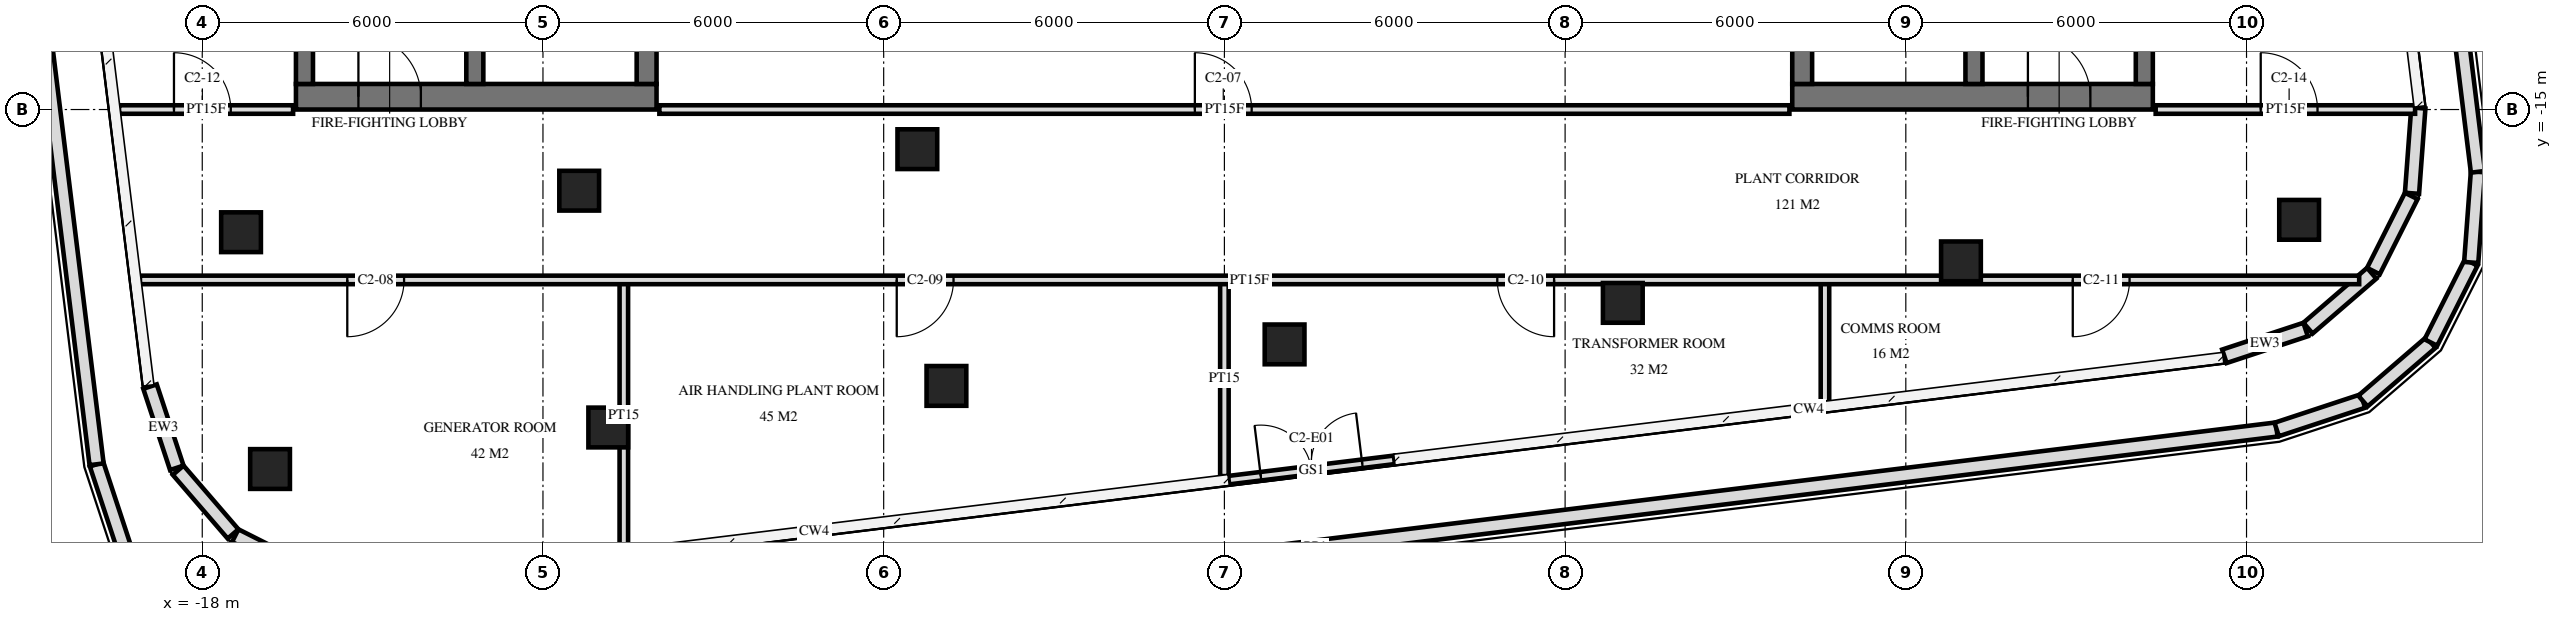
"""IFC4 building model, lengths in metres.
Left out: names, types, materials, properties, quantities, classifications, styles, units other than length and angle.
Written with IfcOpenShell. Run it as: python <this file> out.ifc"""

import sys

from ifc_helpers import new_model, si_unit, direction, frame, frame_2d, origin, origin_2d, place, context, subcontext, project, spatial, rectangle, extrude, element, fill, save


model = new_model("IFC4")
c1 = context("Model", 3, precision=1e-05, world=origin(), true_north=direction((0.0, 1.0)))
c2 = subcontext(c1, "Body", "Model", "MODEL_VIEW")
j1 = project(units=[si_unit("LENGTHUNIT", "METRE"), si_unit("PLANEANGLEUNIT", "RADIAN")], contexts=[c1])
p1 = place(None, origin())
s1 = spatial("IfcSite", under=j1, at=p1, CompositionType="ELEMENT")
p2 = place(p1, origin())
s2 = spatial("IfcBuilding", under=s1, at=p2, CompositionType="ELEMENT")
p3 = place(p2, frame((0.0, 0.0, 350.2)))
s3 = spatial("IfcBuildingStorey", under=s2, at=p3, CompositionType="ELEMENT", Elevation=350.2)
for number, where, z_axis, x_axis in (
    (1, (-17.317, -17.16, 0.0), (0.0, 0.0, 1.0), (1.0, 0.0, 0.0)),
    (2, (-16.806, -21.329, 0.0), (0.0, 0.0, 1.0), (1.0, 0.0, 0.0)),
    (3, (-11.362, -16.429, 0.0), (0.0, 0.0, 1.0), (1.0, 0.0, 0.0)),
    (4, (-10.85, -20.598, 0.0), (0.0, 0.0, 1.0), (1.0, 0.0, 0.0)),
    (5, (-5.407, -15.698, 0.0), (0.0, 0.0, 1.0), (1.0, 0.0, 0.0)),
    (6, (-4.895, -19.866, 0.0), (0.0, 0.0, 1.0), (1.0, 0.0, 0.0)),
    (7, (1.06, -19.135, 0.0), (0.0, 0.0, 1.0), (1.0, 0.0, 0.0)),
    (8, (7.016, -18.404, 0.0), (0.0, 0.0, 1.0), (1.0, 0.0, 0.0)),
    (9, (12.971, -17.673, 0.0), (0.0, 0.0, 1.0), (1.0, 0.0, 0.0)),
    (10, (18.926, -16.942, 0.0), (0.0, 0.0, 1.0), (1.0, 0.0, 0.0)),
):
    element("IfcColumn", number, at=place(p3, frame(where, z_axis=z_axis, x_axis=x_axis)), inside=s3, PredefinedType="COLUMN", context=c2, shape_type="SweptSolid", body=[
        extrude(rectangle(XDim=0.7, YDim=0.7, at=origin_2d()), origin(), (0.0, 0.0, 1.0), 3.6),
    ])
p4 = place(p3, frame((-16.35, -14.775, 0.0), z_axis=(0.0, 0.0, 1.0), x_axis=(1.0, 0.0, 0.0)))
e11 = element("IfcWall", 11, at=p4, inside=s3, PredefinedType="SHEAR", context=c2, shape_type="SweptSolid", body=[
    extrude(rectangle(XDim=6.35, YDim=0.45, at=frame_2d((3.175, 0.0))), origin(), (0.0, 0.0, 1.0), 3.6),
])
p5 = place(p4, frame((1.1, 0.0, 0.0)))
e12 = element("IfcOpeningElement", 12, at=p5, cuts=e11, PredefinedType="OPENING", context=c2, shape_type="SweptSolid", body=[
    extrude(rectangle(XDim=1.1, YDim=2.1, at=frame_2d((0.55, 1.05))), frame((0.0, 0.235, 0.0), z_axis=(0.0, -1.0, 0.0), x_axis=(1.0, 0.0, 0.0)), (0.0, 0.0, 1.0), 0.47),
])
p6 = place(p3, frame((-10.175, -14.55, 0.0), z_axis=(0.0, 0.0, 1.0), x_axis=(0.0, 1.0, 0.0)))
e13 = element("IfcWall", 13, at=p6, inside=s3, PredefinedType="SHEAR", context=c2, shape_type="SweptSolid", body=[
    extrude(rectangle(XDim=14.1, YDim=0.35, at=frame_2d((7.05, 0.0))), origin(), (0.0, 0.0, 1.0), 3.6),
])
p7 = place(p6, frame((4.0, 0.0, 0.0)))
e14 = element("IfcOpeningElement", 14, at=p7, cuts=e13, PredefinedType="OPENING", context=c2, shape_type="SweptSolid", body=[
    extrude(rectangle(XDim=1.2, YDim=2.1, at=frame_2d((0.6, 1.05))), frame((0.0, 0.185, 0.0), z_axis=(0.0, -1.0, 0.0), x_axis=(1.0, 0.0, 0.0)), (0.0, 0.0, 1.0), 0.37),
])
p8 = place(p3, frame((-16.2, -14.55, 0.0), z_axis=(0.0, 0.0, 1.0), x_axis=(0.0, 1.0, 0.0)))
e15 = element("IfcWall", 15, at=p8, inside=s3, PredefinedType="SHEAR", context=c2, shape_type="SweptSolid", body=[
    extrude(rectangle(XDim=5.4, YDim=0.3, at=frame_2d((2.7, 0.0))), origin(), (0.0, 0.0, 1.0), 3.6),
])
p9 = place(p3, frame((-13.2, -14.55, 0.0), z_axis=(0.0, 0.0, 1.0), x_axis=(0.0, 1.0, 0.0)))
e16 = element("IfcWall", 16, at=p9, inside=s3, PredefinedType="SHEAR", context=c2, shape_type="SweptSolid", body=[
    extrude(rectangle(XDim=5.4, YDim=0.3, at=frame_2d((2.7, 0.0))), origin(), (0.0, 0.0, 1.0), 3.6),
])
p10 = place(p9, frame((4.0, 0.0, 0.0)))
e17 = element("IfcOpeningElement", 17, at=p10, cuts=e16, PredefinedType="OPENING", context=c2, shape_type="SweptSolid", body=[
    extrude(rectangle(XDim=1.2, YDim=2.1, at=frame_2d((0.6, 1.05))), frame((0.0, 0.16, 0.0), z_axis=(0.0, -1.0, 0.0), x_axis=(1.0, 0.0, 0.0)), (0.0, 0.0, 1.0), 0.32),
])
p11 = place(p3, frame((10.0, -14.775, 0.0), z_axis=(0.0, 0.0, 1.0), x_axis=(1.0, 0.0, 0.0)))
e18 = element("IfcWall", 18, at=p11, inside=s3, PredefinedType="SHEAR", context=c2, shape_type="SweptSolid", body=[
    extrude(rectangle(XDim=6.35, YDim=0.45, at=frame_2d((3.175, 0.0))), origin(), (0.0, 0.0, 1.0), 3.6),
])
p12 = place(p11, frame((4.15, 0.0, 0.0)))
e19 = element("IfcOpeningElement", 19, at=p12, cuts=e18, PredefinedType="OPENING", context=c2, shape_type="SweptSolid", body=[
    extrude(rectangle(XDim=1.1, YDim=2.1, at=frame_2d((0.55, 1.05))), frame((0.0, 0.235, 0.0), z_axis=(0.0, -1.0, 0.0), x_axis=(1.0, 0.0, 0.0)), (0.0, 0.0, 1.0), 0.47),
])
p13 = place(p3, frame((10.175, -14.55, 0.0), z_axis=(0.0, 0.0, 1.0), x_axis=(0.0, 1.0, 0.0)))
e20 = element("IfcWall", 20, at=p13, inside=s3, PredefinedType="SHEAR", context=c2, shape_type="SweptSolid", body=[
    extrude(rectangle(XDim=14.1, YDim=0.35, at=frame_2d((7.05, 0.0))), origin(), (0.0, 0.0, 1.0), 3.6),
])
p14 = place(p13, frame((4.0, 0.0, 0.0)))
e21 = element("IfcOpeningElement", 21, at=p14, cuts=e20, PredefinedType="OPENING", context=c2, shape_type="SweptSolid", body=[
    extrude(rectangle(XDim=1.2, YDim=2.1, at=frame_2d((0.6, 1.05))), frame((0.0, 0.185, 0.0), z_axis=(0.0, -1.0, 0.0), x_axis=(1.0, 0.0, 0.0)), (0.0, 0.0, 1.0), 0.37),
])
p15 = place(p3, frame((16.2, -14.55, 0.0), z_axis=(0.0, 0.0, 1.0), x_axis=(0.0, 1.0, 0.0)))
e22 = element("IfcWall", 22, at=p15, inside=s3, PredefinedType="SHEAR", context=c2, shape_type="SweptSolid", body=[
    extrude(rectangle(XDim=5.4, YDim=0.3, at=frame_2d((2.7, 0.0))), origin(), (0.0, 0.0, 1.0), 3.6),
])
p16 = place(p3, frame((13.2, -14.55, 0.0), z_axis=(0.0, 0.0, 1.0), x_axis=(0.0, 1.0, 0.0)))
e23 = element("IfcWall", 23, at=p16, inside=s3, PredefinedType="SHEAR", context=c2, shape_type="SweptSolid", body=[
    extrude(rectangle(XDim=5.4, YDim=0.3, at=frame_2d((2.7, 0.0))), origin(), (0.0, 0.0, 1.0), 3.6),
])
p17 = place(p16, frame((4.0, 0.0, 0.0)))
e24 = element("IfcOpeningElement", 24, at=p17, cuts=e23, PredefinedType="OPENING", context=c2, shape_type="SweptSolid", body=[
    extrude(rectangle(XDim=1.2, YDim=2.1, at=frame_2d((0.6, 1.05))), frame((0.0, 0.16, 0.0), z_axis=(0.0, -1.0, 0.0), x_axis=(1.0, 0.0, 0.0)), (0.0, 0.0, 1.0), 0.32),
])
p18 = place(p3, frame((-18.92, -19.878, 0.0), z_axis=(0.0, 0.0, 1.0), x_axis=(0.31321078528, -0.94968363363, 0.0)))
e25 = element("IfcWall", 25, at=p18, inside=s3, PredefinedType="SOLIDWALL", context=c2, shape_type="SweptSolid", body=[
    extrude(rectangle(XDim=1.506, YDim=0.25, at=frame_2d((0.753, 0.0))), origin(), (0.0, 0.0, 1.0), 3.32),
])
p19 = place(p3, frame((-18.424, -21.35, 0.0), z_axis=(0.0, 0.0, 1.0), x_axis=(0.65281239985, -0.757519617305, 0.0)))
e26 = element("IfcWall", 26, at=p19, inside=s3, PredefinedType="SOLIDWALL", context=c2, shape_type="SweptSolid", body=[
    extrude(rectangle(XDim=1.481, YDim=0.25, at=frame_2d((0.74, 0.0))), origin(), (0.0, 0.0, 1.0), 3.32),
])
p20 = place(p3, frame((-17.419, -22.502, 0.0), z_axis=(0.0, 0.0, 1.0), x_axis=(0.893004966714, -0.450046808036, 0.0)))
e27 = element("IfcWall", 27, at=p20, inside=s3, PredefinedType="SOLIDWALL", context=c2, shape_type="SweptSolid", body=[
    extrude(rectangle(XDim=1.481, YDim=0.25, at=frame_2d((0.74, 0.0))), origin(), (0.0, 0.0, 1.0), 3.32),
])
p21 = place(p3, frame((0.075, -21.525, 0.0), z_axis=(0.0, 0.0, 1.0), x_axis=(0.992547507053, 0.121858303952, 0.0)))
e28 = element("IfcWall", 28, at=p21, inside=s3, PredefinedType="USERDEFINED", context=c2, shape_type="SweptSolid", body=[
    extrude(rectangle(XDim=2.941, YDim=0.15, at=frame_2d((1.471, 0.0))), origin(), (0.0, 0.0, 1.0), 3.32),
])
p22 = place(p21, frame((0.571, 0.0, 0.0)))
e29 = element("IfcOpeningElement", 29, at=p22, cuts=e28, PredefinedType="OPENING", context=c2, shape_type="SweptSolid", body=[
    extrude(rectangle(XDim=1.8, YDim=2.4, at=frame_2d((0.9, 1.2))), frame((0.0, 0.085, 0.0), z_axis=(0.0, -1.0, 0.0), x_axis=(1.0, 0.0, 0.0)), (0.0, 0.0, 1.0), 0.17),
])
p23 = place(p3, frame((17.61, -19.345, 0.0), z_axis=(0.0, 0.0, 1.0), x_axis=(0.949715953316, 0.313112772043, 0.0)))
e30 = element("IfcWall", 30, at=p23, inside=s3, PredefinedType="SOLIDWALL", context=c2, shape_type="SweptSolid", body=[
    extrude(rectangle(XDim=1.506, YDim=0.25, at=frame_2d((0.753, 0.0))), origin(), (0.0, 0.0, 1.0), 3.32),
])
for number, where, z_axis, x_axis in (
    (31, (19.083, -18.849, 0.0), (0.0, 0.0, 1.0), (0.758, 0.653, 0.0)),
    (32, (20.234, -17.844, 0.0), (0.0, 0.0, 1.0), (0.45, 0.893, 0.0)),
):
    element("IfcWall", number, at=place(p3, frame(where, z_axis=z_axis, x_axis=x_axis)), inside=s3, PredefinedType="SOLIDWALL", context=c2, shape_type="SweptSolid", body=[
        extrude(rectangle(XDim=1.481, YDim=0.25, at=frame_2d((0.74, 0.0))), origin(), (0.0, 0.0, 1.0), 3.32),
    ])
p24 = place(p3, frame((20.914, -16.475, 0.0), z_axis=(0.0, 0.0, 1.0), x_axis=(0.074092647143, 0.997251362315, 0.0)))
e33 = element("IfcWall", 33, at=p24, inside=s3, PredefinedType="SOLIDWALL", context=c2, shape_type="SweptSolid", body=[
    extrude(rectangle(XDim=1.506, YDim=0.25, at=frame_2d((0.753, 0.0))), origin(), (0.0, 0.0, 1.0), 3.32),
])
p25 = place(p3, frame((19.861, 1.939, 0.0), z_axis=(0.0, 0.0, 1.0), x_axis=(0.121873189279, -0.99254567942, 0.0)))
e34 = element("IfcWall", 34, at=p25, inside=s3, PredefinedType="PARAPET", context=c2, shape_type="SweptSolid", body=[
    extrude(rectangle(XDim=18.171, YDim=0.25, at=frame_2d((9.086, 0.0))), origin(), (0.0, 0.0, 1.0), 1.1),
])
p26 = place(p3, frame((22.075, -16.097, 0.0), z_axis=(0.0, 0.0, 1.0), x_axis=(-0.074141410546, -0.997247738148, 0.0)))
e35 = element("IfcWall", 35, at=p26, inside=s3, PredefinedType="PARAPET", context=c2, shape_type="SweptSolid", body=[
    extrude(rectangle(XDim=1.6, YDim=0.25, at=frame_2d((0.8, 0.0))), origin(), (0.0, 0.0, 1.0), 1.1),
])
for number, where, z_axis, x_axis in (
    (36, (21.957, -17.693, 0.0), (0.0, 0.0, 1.0), (-0.45, -0.893, 0.0)),
    (37, (21.246, -19.102, 0.0), (0.0, 0.0, 1.0), (-0.758, -0.653, 0.0)),
):
    element("IfcWall", number, at=place(p3, frame(where, z_axis=z_axis, x_axis=x_axis)), inside=s3, PredefinedType="PARAPET", context=c2, shape_type="SweptSolid", body=[
        extrude(rectangle(XDim=1.578, YDim=0.25, at=frame_2d((0.789, 0.0))), origin(), (0.0, 0.0, 1.0), 1.1),
    ])
p27 = place(p3, frame((20.051, -20.132, 0.0), z_axis=(0.0, 0.0, 1.0), x_axis=(-0.949670415305, -0.313250861604, 0.0)))
e38 = element("IfcWall", 38, at=p27, inside=s3, PredefinedType="PARAPET", context=c2, shape_type="SweptSolid", body=[
    extrude(rectangle(XDim=1.6, YDim=0.25, at=frame_2d((0.8, 0.0))), origin(), (0.0, 0.0, 1.0), 1.1),
])
p28 = place(p3, frame((18.531, -20.633, 0.0), z_axis=(0.0, 0.0, 1.0), x_axis=(-0.992546721183, -0.121864704768, 0.0)))
e39 = element("IfcWall", 39, at=p28, inside=s3, PredefinedType="PARAPET", context=c2, shape_type="SweptSolid", body=[
    extrude(rectangle(XDim=34.109, YDim=0.25, at=frame_2d((17.055, 0.0))), origin(), (0.0, 0.0, 1.0), 1.1),
])
p29 = place(p3, frame((-19.36, -22.765, 0.0), z_axis=(0.0, 0.0, 1.0), x_axis=(-0.313113242009, 0.949715798373, 0.0)))
e40 = element("IfcWall", 40, at=p29, inside=s3, PredefinedType="PARAPET", context=c2, shape_type="SweptSolid", body=[
    extrude(rectangle(XDim=1.6, YDim=0.25, at=frame_2d((0.8, 0.0))), origin(), (0.0, 0.0, 1.0), 1.1),
])
p30 = place(p3, frame((-19.861, -21.246, 0.0), z_axis=(0.0, 0.0, 1.0), x_axis=(-0.121871564083, 0.992545878974, 0.0)))
e41 = element("IfcWall", 41, at=p30, inside=s3, PredefinedType="PARAPET", context=c2, shape_type="SweptSolid", body=[
    extrude(rectangle(XDim=18.172, YDim=0.25, at=frame_2d((9.086, 0.0))), origin(), (0.0, 0.0, 1.0), 1.1),
])
p31 = place(p3, frame((10.576, -20.156, 0.0), z_axis=(0.0, 0.0, 1.0), x_axis=(0.0, 1.0, 0.0)))
e42 = element("IfcWall", 42, at=p31, inside=s3, PredefinedType="PARTITIONING", context=c2, shape_type="SweptSolid", body=[
    extrude(rectangle(XDim=2.156, YDim=0.15, at=frame_2d((1.078, 0.0))), origin(), (0.0, 0.0, 1.0), 3.32),
])
p32 = place(p3, frame((0.0, -21.454, 0.0), z_axis=(0.0, 0.0, 1.0), x_axis=(0.0, 1.0, 0.0)))
e43 = element("IfcWall", 43, at=p32, inside=s3, PredefinedType="PARTITIONING", context=c2, shape_type="SweptSolid", body=[
    extrude(rectangle(XDim=3.454, YDim=0.15, at=frame_2d((1.727, 0.0))), origin(), (0.0, 0.0, 1.0), 3.32),
])
p33 = place(p3, frame((-10.576, -22.752, 0.0), z_axis=(0.0, 0.0, 1.0), x_axis=(0.0, 1.0, 0.0)))
e44 = element("IfcWall", 44, at=p33, inside=s3, PredefinedType="PARTITIONING", context=c2, shape_type="SweptSolid", body=[
    extrude(rectangle(XDim=4.752, YDim=0.15, at=frame_2d((2.376, 0.0))), origin(), (0.0, 0.0, 1.0), 3.32),
])
p34 = place(p3, frame((-19.097, -18.0, 0.0), z_axis=(0.0, 0.0, 1.0), x_axis=(1.0, 0.0, 0.0)))
e45 = element("IfcWall", 45, at=p34, inside=s3, PredefinedType="PARTITIONING", context=c2, shape_type="SweptSolid", body=[
    extrude(rectangle(XDim=39.081, YDim=0.15, at=frame_2d((19.541, 0.0))), origin(), (0.0, 0.0, 1.0), 3.32),
])
p35 = place(p34, frame((3.651, 0.0, 0.0)))
e46 = element("IfcOpeningElement", 46, at=p35, cuts=e45, PredefinedType="OPENING", context=c2, shape_type="SweptSolid", body=[
    extrude(rectangle(XDim=1.0, YDim=2.1, at=frame_2d((0.5, 1.05))), frame((0.0, 0.085, 0.0), z_axis=(0.0, -1.0, 0.0), x_axis=(1.0, 0.0, 0.0)), (0.0, 0.0, 1.0), 0.17),
])
p36 = place(p34, frame((13.327, 0.0, 0.0)))
e47 = element("IfcOpeningElement", 47, at=p36, cuts=e45, PredefinedType="OPENING", context=c2, shape_type="SweptSolid", body=[
    extrude(rectangle(XDim=1.0, YDim=2.1, at=frame_2d((0.5, 1.05))), frame((0.0, 0.085, 0.0), z_axis=(0.0, -1.0, 0.0), x_axis=(1.0, 0.0, 0.0)), (0.0, 0.0, 1.0), 0.17),
])
p37 = place(p34, frame((23.903, 0.0, 0.0)))
e48 = element("IfcOpeningElement", 48, at=p37, cuts=e45, PredefinedType="OPENING", context=c2, shape_type="SweptSolid", body=[
    extrude(rectangle(XDim=1.0, YDim=2.1, at=frame_2d((0.5, 1.05))), frame((0.0, 0.085, 0.0), z_axis=(0.0, -1.0, 0.0), x_axis=(1.0, 0.0, 0.0)), (0.0, 0.0, 1.0), 0.17),
])
p38 = place(p34, frame((34.037, 0.0, 0.0)))
e49 = element("IfcOpeningElement", 49, at=p38, cuts=e45, PredefinedType="OPENING", context=c2, shape_type="SweptSolid", body=[
    extrude(rectangle(XDim=1.0, YDim=2.1, at=frame_2d((0.5, 1.05))), frame((0.0, 0.085, 0.0), z_axis=(0.0, -1.0, 0.0), x_axis=(1.0, 0.0, 0.0)), (0.0, 0.0, 1.0), 0.17),
])
p39 = place(p3, frame((-19.466, -15.0, 0.0), z_axis=(0.0, 0.0, 1.0), x_axis=(1.0, 0.0, 0.0)))
e50 = element("IfcWall", 50, at=p39, inside=s3, PredefinedType="PARTITIONING", context=c2, shape_type="SweptSolid", body=[
    extrude(rectangle(XDim=3.066, YDim=0.15, at=frame_2d((1.533, 0.0))), origin(), (0.0, 0.0, 1.0), 3.32),
])
p40 = place(p39, frame((0.968, 0.0, 0.0)))
e51 = element("IfcOpeningElement", 51, at=p40, cuts=e50, PredefinedType="OPENING", context=c2, shape_type="SweptSolid", body=[
    extrude(rectangle(XDim=1.0, YDim=2.1, at=frame_2d((0.5, 1.05))), frame((0.0, 0.085, 0.0), z_axis=(0.0, -1.0, 0.0), x_axis=(1.0, 0.0, 0.0)), (0.0, 0.0, 1.0), 0.17),
])
p41 = place(p3, frame((-9.95, -15.0, 0.0), z_axis=(0.0, 0.0, 1.0), x_axis=(1.0, 0.0, 0.0)))
e52 = element("IfcWall", 52, at=p41, inside=s3, PredefinedType="PARTITIONING", context=c2, shape_type="SweptSolid", body=[
    extrude(rectangle(XDim=19.9, YDim=0.15, at=frame_2d((9.95, 0.0))), origin(), (0.0, 0.0, 1.0), 2.684),
])
p42 = place(p41, frame((9.43, 0.0, 0.0)))
e53 = element("IfcOpeningElement", 53, at=p42, cuts=e52, PredefinedType="OPENING", context=c2, shape_type="SweptSolid", body=[
    extrude(rectangle(XDim=1.0, YDim=2.1, at=frame_2d((0.5, 1.05))), frame((0.0, 0.085, 0.0), z_axis=(0.0, -1.0, 0.0), x_axis=(1.0, 0.0, 0.0)), (0.0, 0.0, 1.0), 0.17),
])
p43 = place(p3, frame((16.4, -15.0, 0.0), z_axis=(0.0, 0.0, 1.0), x_axis=(1.0, 0.0, 0.0)))
e54 = element("IfcWall", 54, at=p43, inside=s3, PredefinedType="PARTITIONING", context=c2, shape_type="SweptSolid", body=[
    extrude(rectangle(XDim=4.569, YDim=0.15, at=frame_2d((2.284, 0.0))), origin(), (0.0, 0.0, 1.0), 3.32),
])
p44 = place(p43, frame((1.85, 0.0, 0.0)))
e55 = element("IfcOpeningElement", 55, at=p44, cuts=e54, PredefinedType="OPENING", context=c2, shape_type="SweptSolid", body=[
    extrude(rectangle(XDim=1.0, YDim=2.1, at=frame_2d((0.5, 1.05))), frame((0.0, 0.085, 0.0), z_axis=(0.0, -1.0, 0.0), x_axis=(1.0, 0.0, 0.0)), (0.0, 0.0, 1.0), 0.17),
])
p45 = place(p22, origin())
e56 = element("IfcDoor", 56, at=p45, inside=s3, OperationType="DOUBLE_DOOR_SINGLE_SWING", PredefinedType="DOOR", context=c2, shape_type="SweptSolid", body=[
    extrude(rectangle(XDim=1.8, YDim=2.4, at=frame_2d((0.9, 1.2))), frame((0.0, 0.025, 0.0), z_axis=(0.0, -1.0, 0.0), x_axis=(1.0, 0.0, 0.0)), (0.0, 0.0, 1.0), 0.05),
])
fill(e29, e56)
p46 = place(p5, origin())
e57 = element("IfcDoor", 57, at=p46, inside=s3, OperationType="SINGLE_SWING_RIGHT", PredefinedType="DOOR", context=c2, shape_type="SweptSolid", body=[
    extrude(rectangle(XDim=1.1, YDim=2.1, at=frame_2d((0.55, 1.05))), frame((0.0, 0.025, 0.0), z_axis=(0.0, -1.0, 0.0), x_axis=(1.0, 0.0, 0.0)), (0.0, 0.0, 1.0), 0.05),
])
fill(e12, e57)
p47 = place(p12, origin())
e58 = element("IfcDoor", 58, at=p47, inside=s3, OperationType="SINGLE_SWING_RIGHT", PredefinedType="DOOR", context=c2, shape_type="SweptSolid", body=[
    extrude(rectangle(XDim=1.1, YDim=2.1, at=frame_2d((0.55, 1.05))), frame((0.0, 0.025, 0.0), z_axis=(0.0, -1.0, 0.0), x_axis=(1.0, 0.0, 0.0)), (0.0, 0.0, 1.0), 0.05),
])
fill(e19, e58)
p48 = place(p42, origin())
e59 = element("IfcDoor", 59, at=p48, inside=s3, OperationType="SINGLE_SWING_RIGHT", PredefinedType="DOOR", context=c2, shape_type="SweptSolid", body=[
    extrude(rectangle(XDim=1.0, YDim=2.1, at=frame_2d((0.5, 1.05))), frame((0.0, 0.025, 0.0), z_axis=(0.0, -1.0, 0.0), x_axis=(1.0, 0.0, 0.0)), (0.0, 0.0, 1.0), 0.05),
])
fill(e53, e59)
p49 = place(p35, frame((0.5, 0.0, 0.0), z_axis=(0.0, 0.0, 1.0), x_axis=(-1.0, 0.0, 0.0)))
e60 = element("IfcDoor", 60, at=p49, inside=s3, OperationType="SINGLE_SWING_LEFT", PredefinedType="DOOR", context=c2, shape_type="SweptSolid", body=[
    extrude(rectangle(XDim=1.0, YDim=2.1, at=frame_2d((0.0, 1.05))), frame((0.0, -0.025, 0.0), z_axis=(0.0, 1.0, 0.0), x_axis=(-1.0, 0.0, 0.0)), (0.0, 0.0, 1.0), 0.05),
])
fill(e46, e60)
p50 = place(p36, frame((0.5, 0.0, 0.0), z_axis=(0.0, 0.0, 1.0), x_axis=(-1.0, 0.0, 0.0)))
e61 = element("IfcDoor", 61, at=p50, inside=s3, OperationType="SINGLE_SWING_LEFT", PredefinedType="DOOR", context=c2, shape_type="SweptSolid", body=[
    extrude(rectangle(XDim=1.0, YDim=2.1, at=frame_2d((0.0, 1.05))), frame((0.0, -0.025, 0.0), z_axis=(0.0, 1.0, 0.0), x_axis=(-1.0, 0.0, 0.0)), (0.0, 0.0, 1.0), 0.05),
])
fill(e47, e61)
p51 = place(p37, frame((0.5, 0.0, 0.0), z_axis=(0.0, 0.0, 1.0), x_axis=(-1.0, 0.0, 0.0)))
e62 = element("IfcDoor", 62, at=p51, inside=s3, OperationType="SINGLE_SWING_RIGHT", PredefinedType="DOOR", context=c2, shape_type="SweptSolid", body=[
    extrude(rectangle(XDim=1.0, YDim=2.1, at=frame_2d((0.0, 1.05))), frame((0.0, -0.025, 0.0), z_axis=(0.0, 1.0, 0.0), x_axis=(-1.0, 0.0, 0.0)), (0.0, 0.0, 1.0), 0.05),
])
fill(e48, e62)
p52 = place(p38, frame((0.5, 0.0, 0.0), z_axis=(0.0, 0.0, 1.0), x_axis=(-1.0, 0.0, 0.0)))
e63 = element("IfcDoor", 63, at=p52, inside=s3, OperationType="SINGLE_SWING_LEFT", PredefinedType="DOOR", context=c2, shape_type="SweptSolid", body=[
    extrude(rectangle(XDim=1.0, YDim=2.1, at=frame_2d((0.0, 1.05))), frame((0.0, -0.025, 0.0), z_axis=(0.0, 1.0, 0.0), x_axis=(-1.0, 0.0, 0.0)), (0.0, 0.0, 1.0), 0.05),
])
fill(e49, e63)
p53 = place(p40, origin())
e64 = element("IfcDoor", 64, at=p53, inside=s3, OperationType="SINGLE_SWING_RIGHT", PredefinedType="DOOR", context=c2, shape_type="SweptSolid", body=[
    extrude(rectangle(XDim=1.0, YDim=2.1, at=frame_2d((0.5, 1.05))), frame((0.0, 0.025, 0.0), z_axis=(0.0, -1.0, 0.0), x_axis=(1.0, 0.0, 0.0)), (0.0, 0.0, 1.0), 0.05),
])
fill(e51, e64)
p54 = place(p44, origin())
e65 = element("IfcDoor", 65, at=p54, inside=s3, OperationType="SINGLE_SWING_RIGHT", PredefinedType="DOOR", context=c2, shape_type="SweptSolid", body=[
    extrude(rectangle(XDim=1.0, YDim=2.1, at=frame_2d((0.5, 1.05))), frame((0.0, 0.025, 0.0), z_axis=(0.0, -1.0, 0.0), x_axis=(1.0, 0.0, 0.0)), (0.0, 0.0, 1.0), 0.05),
])
fill(e55, e65)
save(model, sys.argv[1])
